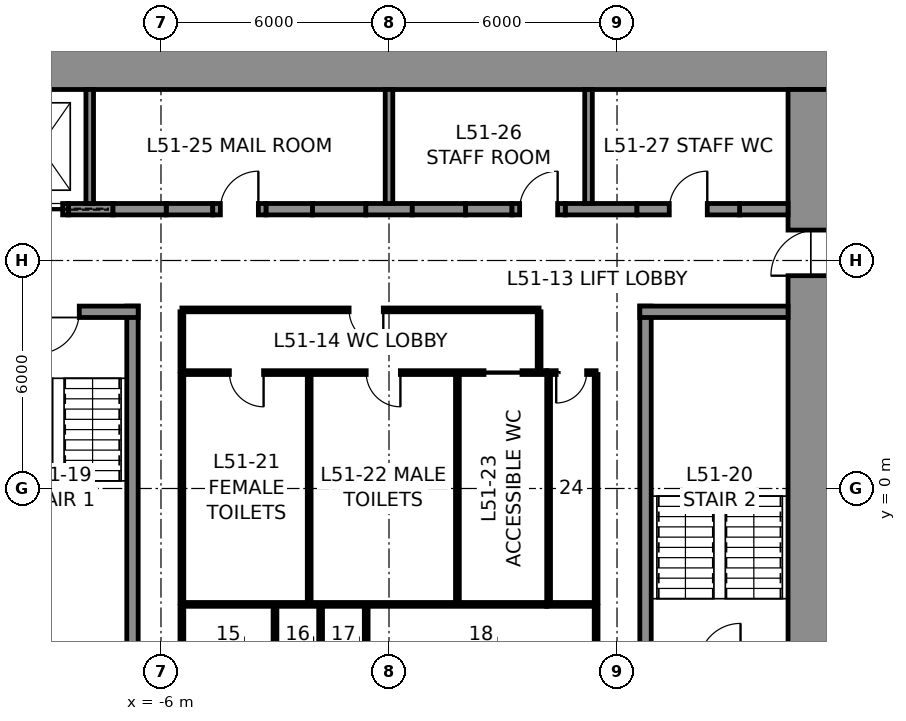
"""IFC4 building model, lengths in metres.
Left out: names, types, materials, properties, quantities, classifications, styles, units other than length and angle.
Written with IfcOpenShell. Run it as: python <this file> out.ifc"""

import sys

from ifc_helpers import new_model, si_unit, direction, frame, frame_2d, origin, place, context, subcontext, project, spatial, rectangle, extrude, element, fill, save


model = new_model("IFC4")
c1 = context("Model", 3, precision=1e-05, world=origin(), true_north=direction((0.0, 1.0)))
c2 = subcontext(c1, "Body", "Model", "MODEL_VIEW")
j1 = project(units=[si_unit("LENGTHUNIT", "METRE"), si_unit("PLANEANGLEUNIT", "RADIAN")], contexts=[c1])
p1 = place(None, origin())
s1 = spatial("IfcSite", under=j1, at=p1, CompositionType="ELEMENT")
p2 = place(p1, origin())
s2 = spatial("IfcBuilding", under=s1, at=p2, CompositionType="ELEMENT")
p3 = place(p2, frame((0.0, 0.0, 233.8)))
s3 = spatial("IfcBuildingStorey", under=s2, at=p3, CompositionType="ELEMENT", Elevation=233.8)
p4 = place(p3, frame((-12.0, 11.25, 0.0), z_axis=(0.0, 0.0, 1.0), x_axis=(1.0, 0.0, 0.0)))
e1 = element("IfcWall", 1, at=p4, inside=s3, PredefinedType="SHEAR", context=c2, shape_type="SweptSolid", body=[
    extrude(rectangle(XDim=24.0, YDim=1.5, at=frame_2d((12.0, 0.0))), origin(), (0.0, 0.0, 1.0), 4.0),
])
p5 = place(p3, frame((11.25, 10.5, 0.0), z_axis=(0.0, 0.0, 1.0), x_axis=(0.0, -1.0, 0.0)))
e2 = element("IfcWall", 2, at=p5, inside=s3, PredefinedType="SHEAR", context=c2, shape_type="SweptSolid", body=[
    extrude(rectangle(XDim=21.0, YDim=1.5, at=frame_2d((10.5, 0.0))), origin(), (0.0, 0.0, 1.0), 4.0),
])
p6 = place(p5, frame((3.7, 0.0, 0.0)))
e3 = element("IfcOpeningElement", 3, at=p6, cuts=e2, PredefinedType="OPENING", context=c2, shape_type="SweptSolid", body=[
    extrude(rectangle(XDim=1.2, YDim=2.3, at=frame_2d((0.6, 1.15))), frame((0.0, 0.76, 0.0), z_axis=(0.0, -1.0, 0.0), x_axis=(1.0, 0.0, 0.0)), (0.0, 0.0, 1.0), 1.52),
])
p7 = place(p5, frame((16.1, 0.0, 0.0)))
e4 = element("IfcOpeningElement", 4, at=p7, cuts=e2, PredefinedType="OPENING", context=c2, shape_type="SweptSolid", body=[
    extrude(rectangle(XDim=1.2, YDim=2.3, at=frame_2d((0.6, 1.15))), frame((0.0, 0.76, 0.0), z_axis=(0.0, -1.0, 0.0), x_axis=(1.0, 0.0, 0.0)), (0.0, 0.0, 1.0), 1.52),
])
p8 = place(p3, frame((-8.438, 7.35, 0.0), z_axis=(0.0, 0.0, 1.0), x_axis=(1.0, 0.0, 0.0)))
e5 = element("IfcWall", 5, at=p8, inside=s3, PredefinedType="SHEAR", context=c2, shape_type="SweptSolid", body=[
    extrude(rectangle(XDim=1.175, YDim=0.3, at=frame_2d((0.587, 0.0))), origin(), (0.0, 0.0, 1.0), 4.0),
])
for number, where, z_axis, x_axis in (
    (6, (-5.863, 7.35, 0.0), (0.0, 0.0, 1.0), (1.0, 0.0, 0.0)),
    (7, (-3.238, 7.35, 0.0), (0.0, 0.0, 1.0), (1.0, 0.0, 0.0)),
    (8, (-0.613, 7.35, 0.0), (0.0, 0.0, 1.0), (1.0, 0.0, 0.0)),
    (9, (2.012, 7.35, 0.0), (0.0, 0.0, 1.0), (1.0, 0.0, 0.0)),
):
    element("IfcWall", number, at=place(p3, frame(where, z_axis=z_axis, x_axis=x_axis)), inside=s3, PredefinedType="SHEAR", context=c2, shape_type="SweptSolid", body=[
        extrude(rectangle(XDim=1.225, YDim=0.3, at=frame_2d((0.613, 0.0))), origin(), (0.0, 0.0, 1.0), 4.0),
    ])
p9 = place(p3, frame((4.637, 7.35, 0.0), z_axis=(0.0, 0.0, 1.0), x_axis=(1.0, 0.0, 0.0)))
e10 = element("IfcWall", 10, at=p9, inside=s3, PredefinedType="SHEAR", context=c2, shape_type="SweptSolid", body=[
    extrude(rectangle(XDim=1.887, YDim=0.3, at=frame_2d((0.944, 0.0))), origin(), (0.0, 0.0, 1.0), 4.0),
])
p10 = place(p3, frame((9.225, 7.35, 0.0), z_axis=(0.0, 0.0, 1.0), x_axis=(1.0, 0.0, 0.0)))
e11 = element("IfcWall", 11, at=p10, inside=s3, PredefinedType="SHEAR", context=c2, shape_type="SweptSolid", body=[
    extrude(rectangle(XDim=1.275, YDim=0.3, at=frame_2d((0.637, 0.0))), origin(), (0.0, 0.0, 1.0), 4.0),
])
p11 = place(p3, frame((-9.938, 7.35, 0.0), z_axis=(0.0, 0.0, 1.0), x_axis=(1.0, 0.0, 0.0)))
e12 = element("IfcWall", 12, at=p11, inside=s3, PredefinedType="PARTITIONING", context=c2, shape_type="SweptSolid", body=[
    extrude(rectangle(XDim=1.5, YDim=0.3, at=frame_2d((0.75, 0.0))), origin(), (0.0, 0.0, 1.0), 4.0),
])
p12 = place(p11, frame((0.15, 0.0, 0.0)))
e13 = element("IfcOpeningElement", 13, at=p12, cuts=e12, PredefinedType="OPENING", context=c2, shape_type="SweptSolid", body=[
    extrude(rectangle(XDim=1.2, YDim=2.3, at=frame_2d((0.6, 1.15))), frame((0.0, 0.16, 0.0), z_axis=(0.0, -1.0, 0.0), x_axis=(1.0, 0.0, 0.0)), (0.0, 0.0, 1.0), 0.32),
])
p13 = place(p3, frame((-7.262, 7.35, 0.0), z_axis=(0.0, 0.0, 1.0), x_axis=(1.0, 0.0, 0.0)))
e14 = element("IfcWall", 14, at=p13, inside=s3, PredefinedType="PARTITIONING", context=c2, shape_type="SweptSolid", body=[
    extrude(rectangle(XDim=1.4, YDim=0.3, at=frame_2d((0.7, 0.0))), origin(), (0.0, 0.0, 1.0), 4.0),
])
p14 = place(p3, frame((-4.637, 7.35, 0.0), z_axis=(0.0, 0.0, 1.0), x_axis=(1.0, 0.0, 0.0)))
e15 = element("IfcWall", 15, at=p14, inside=s3, PredefinedType="PARTITIONING", context=c2, shape_type="SweptSolid", body=[
    extrude(rectangle(XDim=1.4, YDim=0.3, at=frame_2d((0.7, 0.0))), origin(), (0.0, 0.0, 1.0), 4.0),
])
p15 = place(p14, frame((0.2, 0.0, 0.0)))
e16 = element("IfcOpeningElement", 16, at=p15, cuts=e15, PredefinedType="OPENING", context=c2, shape_type="SweptSolid", body=[
    extrude(rectangle(XDim=1.0, YDim=2.3, at=frame_2d((0.5, 1.15))), frame((0.0, 0.16, 0.0), z_axis=(0.0, -1.0, 0.0), x_axis=(1.0, 0.0, 0.0)), (0.0, 0.0, 1.0), 0.32),
])
for number, where, z_axis, x_axis in (
    (17, (-2.012, 7.35, 0.0), (0.0, 0.0, 1.0), (1.0, 0.0, 0.0)),
    (18, (0.613, 7.35, 0.0), (0.0, 0.0, 1.0), (1.0, 0.0, 0.0)),
):
    element("IfcWall", number, at=place(p3, frame(where, z_axis=z_axis, x_axis=x_axis)), inside=s3, PredefinedType="PARTITIONING", context=c2, shape_type="SweptSolid", body=[
        extrude(rectangle(XDim=1.4, YDim=0.3, at=frame_2d((0.7, 0.0))), origin(), (0.0, 0.0, 1.0), 4.0),
    ])
p16 = place(p3, frame((3.238, 7.35, 0.0), z_axis=(0.0, 0.0, 1.0), x_axis=(1.0, 0.0, 0.0)))
e19 = element("IfcWall", 19, at=p16, inside=s3, PredefinedType="PARTITIONING", context=c2, shape_type="SweptSolid", body=[
    extrude(rectangle(XDim=1.4, YDim=0.3, at=frame_2d((0.7, 0.0))), origin(), (0.0, 0.0, 1.0), 4.0),
])
p17 = place(p16, frame((0.2, 0.0, 0.0)))
e20 = element("IfcOpeningElement", 20, at=p17, cuts=e19, PredefinedType="OPENING", context=c2, shape_type="SweptSolid", body=[
    extrude(rectangle(XDim=1.0, YDim=2.3, at=frame_2d((0.5, 1.15))), frame((0.0, 0.16, 0.0), z_axis=(0.0, -1.0, 0.0), x_axis=(1.0, 0.0, 0.0)), (0.0, 0.0, 1.0), 0.32),
])
p18 = place(p3, frame((6.525, 7.35, 0.0), z_axis=(0.0, 0.0, 1.0), x_axis=(1.0, 0.0, 0.0)))
e21 = element("IfcWall", 21, at=p18, inside=s3, PredefinedType="PARTITIONING", context=c2, shape_type="SweptSolid", body=[
    extrude(rectangle(XDim=2.7, YDim=0.3, at=frame_2d((1.35, 0.0))), origin(), (0.0, 0.0, 1.0), 4.0),
])
p19 = place(p18, frame((0.85, 0.0, 0.0)))
e22 = element("IfcOpeningElement", 22, at=p19, cuts=e21, PredefinedType="OPENING", context=c2, shape_type="SweptSolid", body=[
    extrude(rectangle(XDim=1.0, YDim=2.3, at=frame_2d((0.5, 1.15))), frame((0.0, 0.16, 0.0), z_axis=(0.0, -1.0, 0.0), x_axis=(1.0, 0.0, 0.0)), (0.0, 0.0, 1.0), 0.32),
])
for number, where, z_axis, x_axis in (
    (23, (-7.875, 7.5, 0.0), (0.0, 0.0, 1.0), (0.0, 1.0, 0.0)),
    (24, (0.0, 7.5, 0.0), (0.0, 0.0, 1.0), (0.0, 1.0, 0.0)),
    (25, (5.25, 7.5, 0.0), (0.0, 0.0, 1.0), (0.0, 1.0, 0.0)),
):
    element("IfcWall", number, at=place(p3, frame(where, z_axis=z_axis, x_axis=x_axis)), inside=s3, PredefinedType="PARTITIONING", context=c2, shape_type="SweptSolid", body=[
        extrude(rectangle(XDim=3.0, YDim=0.2, at=frame_2d((1.5, 0.0))), origin(), (0.0, 0.0, 1.0), 4.0),
    ])
p20 = place(p3, frame((-6.75, -4.8, 0.0), z_axis=(0.0, 0.0, 1.0), x_axis=(0.0, 1.0, 0.0)))
e26 = element("IfcWall", 26, at=p20, inside=s3, PredefinedType="SOLIDWALL", context=c2, shape_type="SweptSolid", body=[
    extrude(rectangle(XDim=9.6, YDim=0.3, at=frame_2d((4.8, 0.0))), origin(), (0.0, 0.0, 1.0), 3.75),
])
p21 = place(p3, frame((-10.5, 4.65, 0.0), z_axis=(0.0, 0.0, 1.0), x_axis=(1.0, 0.0, 0.0)))
e27 = element("IfcWall", 27, at=p21, inside=s3, PredefinedType="SOLIDWALL", context=c2, shape_type="SweptSolid", body=[
    extrude(rectangle(XDim=3.9, YDim=0.3, at=frame_2d((1.95, 0.0))), origin(), (0.0, 0.0, 1.0), 3.75),
])
p22 = place(p21, frame((1.25, 0.0, 0.0)))
e28 = element("IfcOpeningElement", 28, at=p22, cuts=e27, PredefinedType="OPENING", context=c2, shape_type="SweptSolid", body=[
    extrude(rectangle(XDim=1.1, YDim=2.3, at=frame_2d((0.55, 1.15))), frame((0.0, 0.16, 0.0), z_axis=(0.0, -1.0, 0.0), x_axis=(1.0, 0.0, 0.0)), (0.0, 0.0, 1.0), 0.32),
])
p23 = place(p3, frame((6.75, -4.8, 0.0), z_axis=(0.0, 0.0, 1.0), x_axis=(0.0, 1.0, 0.0)))
e29 = element("IfcWall", 29, at=p23, inside=s3, PredefinedType="SOLIDWALL", context=c2, shape_type="SweptSolid", body=[
    extrude(rectangle(XDim=9.6, YDim=0.3, at=frame_2d((4.8, 0.0))), origin(), (0.0, 0.0, 1.0), 3.75),
])
p24 = place(p3, frame((6.6, 4.65, 0.0), z_axis=(0.0, 0.0, 1.0), x_axis=(1.0, 0.0, 0.0)))
e30 = element("IfcWall", 30, at=p24, inside=s3, PredefinedType="SOLIDWALL", context=c2, shape_type="SweptSolid", body=[
    extrude(rectangle(XDim=3.9, YDim=0.3, at=frame_2d((1.95, 0.0))), origin(), (0.0, 0.0, 1.0), 3.75),
])
p25 = place(p3, frame((-5.45, 3.05, 0.0), z_axis=(0.0, 0.0, 1.0), x_axis=(1.0, 0.0, 0.0)))
e31 = element("IfcWall", 31, at=p25, inside=s3, PredefinedType="PARTITIONING", context=c2, shape_type="SweptSolid", body=[
    extrude(rectangle(XDim=9.6, YDim=0.1, at=frame_2d((4.8, 0.0))), origin(), (0.0, 0.0, 1.0), 3.75),
])
p26 = place(p25, frame((1.25, 0.0, 0.0)))
e32 = element("IfcOpeningElement", 32, at=p26, cuts=e31, PredefinedType="OPENING", context=c2, shape_type="SweptSolid", body=[
    extrude(rectangle(XDim=0.9, YDim=2.3, at=frame_2d((0.45, 1.15))), frame((0.0, 0.06, 0.0), z_axis=(0.0, -1.0, 0.0), x_axis=(1.0, 0.0, 0.0)), (0.0, 0.0, 1.0), 0.12),
])
p27 = place(p25, frame((4.85, 0.0, 0.0)))
e33 = element("IfcOpeningElement", 33, at=p27, cuts=e31, PredefinedType="OPENING", context=c2, shape_type="SweptSolid", body=[
    extrude(rectangle(XDim=0.9, YDim=2.3, at=frame_2d((0.45, 1.15))), frame((0.0, 0.06, 0.0), z_axis=(0.0, -1.0, 0.0), x_axis=(1.0, 0.0, 0.0)), (0.0, 0.0, 1.0), 0.12),
])
p28 = place(p25, frame((7.95, 0.0, 0.0)))
e34 = element("IfcOpeningElement", 34, at=p28, cuts=e31, PredefinedType="OPENING", context=c2, shape_type="SweptSolid", body=[
    extrude(rectangle(XDim=1.0, YDim=2.3, at=frame_2d((0.5, 1.15))), frame((0.0, 0.06, 0.0), z_axis=(0.0, -1.0, 0.0), x_axis=(1.0, 0.0, 0.0)), (0.0, 0.0, 1.0), 0.12),
])
p29 = place(p3, frame((4.15, 3.05, 0.0), z_axis=(0.0, 0.0, 1.0), x_axis=(1.0, 0.0, 0.0)))
e35 = element("IfcWall", 35, at=p29, inside=s3, PredefinedType="PARTITIONING", context=c2, shape_type="SweptSolid", body=[
    extrude(rectangle(XDim=1.3, YDim=0.1, at=frame_2d((0.65, 0.0))), origin(), (0.0, 0.0, 1.0), 3.75),
])
p30 = place(p29, frame((0.25, 0.0, 0.0)))
e36 = element("IfcOpeningElement", 36, at=p30, cuts=e35, PredefinedType="OPENING", context=c2, shape_type="SweptSolid", body=[
    extrude(rectangle(XDim=0.8, YDim=2.3, at=frame_2d((0.4, 1.15))), frame((0.0, 0.06, 0.0), z_axis=(0.0, -1.0, 0.0), x_axis=(1.0, 0.0, 0.0)), (0.0, 0.0, 1.0), 0.12),
])
p31 = place(p3, frame((4.15, -3.05, 0.0), z_axis=(0.0, 0.0, 1.0), x_axis=(-1.0, 0.0, 0.0)))
e37 = element("IfcWall", 37, at=p31, inside=s3, PredefinedType="PARTITIONING", context=c2, shape_type="SweptSolid", body=[
    extrude(rectangle(XDim=9.6, YDim=0.1, at=frame_2d((4.8, 0.0))), origin(), (0.0, 0.0, 1.0), 3.75),
])
p32 = place(p3, frame((5.45, -3.05, 0.0), z_axis=(0.0, 0.0, 1.0), x_axis=(-1.0, 0.0, 0.0)))
e38 = element("IfcWall", 38, at=p32, inside=s3, PredefinedType="PARTITIONING", context=c2, shape_type="SweptSolid", body=[
    extrude(rectangle(XDim=1.3, YDim=0.1, at=frame_2d((0.65, 0.0))), origin(), (0.0, 0.0, 1.0), 3.75),
])
for number, where, z_axis, x_axis in (
    (39, (5.45, 3.0, 0.0), (0.0, 0.0, 1.0), (0.0, -1.0, 0.0)),
    (40, (-5.45, -3.0, 0.0), (0.0, 0.0, 1.0), (0.0, 1.0, 0.0)),
    (41, (-2.1, -3.0, 0.0), (0.0, 0.0, 1.0), (0.0, 1.0, 0.0)),
    (42, (1.8, -3.0, 0.0), (0.0, 0.0, 1.0), (0.0, 1.0, 0.0)),
    (43, (4.2, -3.0, 0.0), (0.0, 0.0, 1.0), (0.0, 1.0, 0.0)),
):
    element("IfcWall", number, at=place(p3, frame(where, z_axis=z_axis, x_axis=x_axis)), inside=s3, PredefinedType="PARTITIONING", context=c2, shape_type="SweptSolid", body=[
        extrude(rectangle(XDim=6.0, YDim=0.1, at=frame_2d((3.0, 0.0))), origin(), (0.0, 0.0, 1.0), 3.75),
    ])
p33 = place(p3, frame((-5.45, 4.7, 0.0), z_axis=(0.0, 0.0, 1.0), x_axis=(1.0, 0.0, 0.0)))
e44 = element("IfcWall", 44, at=p33, inside=s3, PredefinedType="PARTITIONING", context=c2, shape_type="SweptSolid", body=[
    extrude(rectangle(XDim=9.4, YDim=0.1, at=frame_2d((4.7, 0.0))), origin(), (0.0, 0.0, 1.0), 3.75),
])
p34 = place(p33, frame((4.4, 0.0, 0.0)))
e45 = element("IfcOpeningElement", 45, at=p34, cuts=e44, PredefinedType="OPENING", context=c2, shape_type="SweptSolid", body=[
    extrude(rectangle(XDim=0.9, YDim=2.3, at=frame_2d((0.45, 1.15))), frame((0.0, 0.06, 0.0), z_axis=(0.0, -1.0, 0.0), x_axis=(1.0, 0.0, 0.0)), (0.0, 0.0, 1.0), 0.12),
])
for number, where, z_axis, x_axis in (
    (46, (-5.45, 3.1, 0.0), (0.0, 0.0, 1.0), (0.0, 1.0, 0.0)),
    (47, (3.95, 3.1, 0.0), (0.0, 0.0, 1.0), (0.0, 1.0, 0.0)),
    (48, (-5.45, -3.1, 0.0), (0.0, 0.0, 1.0), (0.0, -1.0, 0.0)),
    (49, (5.45, -3.1, 0.0), (0.0, 0.0, 1.0), (0.0, -1.0, 0.0)),
    (50, (-3.0, -3.1, 0.0), (0.0, 0.0, 1.0), (0.0, -1.0, 0.0)),
    (51, (-1.8, -3.1, 0.0), (0.0, 0.0, 1.0), (0.0, -1.0, 0.0)),
    (52, (-0.6, -3.1, 0.0), (0.0, 0.0, 1.0), (0.0, -1.0, 0.0)),
):
    element("IfcWall", number, at=place(p3, frame(where, z_axis=z_axis, x_axis=x_axis)), inside=s3, PredefinedType="PARTITIONING", context=c2, shape_type="SweptSolid", body=[
        extrude(rectangle(XDim=1.55, YDim=0.1, at=frame_2d((0.775, 0.0))), origin(), (0.0, 0.0, 1.0), 3.75),
    ])
p35 = place(p22, frame((1.1, 0.0, 0.0), z_axis=(0.0, 0.0, 1.0), x_axis=(-1.0, 0.0, 0.0)))
e53 = element("IfcDoor", 53, at=p35, inside=s3, OperationType="SINGLE_SWING_RIGHT", PredefinedType="DOOR", context=c2, shape_type="SweptSolid", body=[
    extrude(rectangle(XDim=1.1, YDim=2.3, at=frame_2d((0.55, 1.15))), frame((0.0, 0.025, 0.0), z_axis=(0.0, -1.0, 0.0), x_axis=(1.0, 0.0, 0.0)), (0.0, 0.0, 1.0), 0.05),
])
fill(e28, e53)
p36 = place(p26, frame((0.9, 0.0, 0.0), z_axis=(0.0, 0.0, 1.0), x_axis=(-1.0, 0.0, 0.0)))
e54 = element("IfcDoor", 54, at=p36, inside=s3, OperationType="SINGLE_SWING_LEFT", PredefinedType="DOOR", context=c2, shape_type="SweptSolid", body=[
    extrude(rectangle(XDim=0.9, YDim=2.3, at=frame_2d((0.45, 1.15))), frame((0.0, 0.025, 0.0), z_axis=(0.0, -1.0, 0.0), x_axis=(1.0, 0.0, 0.0)), (0.0, 0.0, 1.0), 0.05),
])
fill(e32, e54)
p37 = place(p27, frame((0.9, 0.0, 0.0), z_axis=(0.0, 0.0, 1.0), x_axis=(-1.0, 0.0, 0.0)))
e55 = element("IfcDoor", 55, at=p37, inside=s3, OperationType="SINGLE_SWING_LEFT", PredefinedType="DOOR", context=c2, shape_type="SweptSolid", body=[
    extrude(rectangle(XDim=0.9, YDim=2.3, at=frame_2d((0.45, 1.15))), frame((0.0, 0.025, 0.0), z_axis=(0.0, -1.0, 0.0), x_axis=(1.0, 0.0, 0.0)), (0.0, 0.0, 1.0), 0.05),
])
fill(e33, e55)
p38 = place(p28, frame((1.0, 0.0, 0.0), z_axis=(0.0, 0.0, 1.0), x_axis=(-1.0, 0.0, 0.0)))
e56 = element("IfcDoor", 56, at=p38, inside=s3, OperationType="SLIDING_TO_LEFT", PredefinedType="DOOR", context=c2, shape_type="SweptSolid", body=[
    extrude(rectangle(XDim=1.0, YDim=2.3, at=frame_2d((0.5, 1.15))), frame((0.0, 0.025, 0.0), z_axis=(0.0, -1.0, 0.0), x_axis=(1.0, 0.0, 0.0)), (0.0, 0.0, 1.0), 0.05),
])
fill(e34, e56)
p39 = place(p30, frame((0.8, 0.0, 0.0), z_axis=(0.0, 0.0, 1.0), x_axis=(-1.0, 0.0, 0.0)))
e57 = element("IfcDoor", 57, at=p39, inside=s3, OperationType="SINGLE_SWING_RIGHT", PredefinedType="DOOR", context=c2, shape_type="SweptSolid", body=[
    extrude(rectangle(XDim=0.8, YDim=2.3, at=frame_2d((0.4, 1.15))), frame((0.0, 0.025, 0.0), z_axis=(0.0, -1.0, 0.0), x_axis=(1.0, 0.0, 0.0)), (0.0, 0.0, 1.0), 0.05),
])
fill(e36, e57)
p40 = place(p34, frame((0.9, 0.0, 0.0), z_axis=(0.0, 0.0, 1.0), x_axis=(-1.0, 0.0, 0.0)))
e58 = element("IfcDoor", 58, at=p40, inside=s3, OperationType="SINGLE_SWING_LEFT", PredefinedType="DOOR", context=c2, shape_type="SweptSolid", body=[
    extrude(rectangle(XDim=0.9, YDim=2.3, at=frame_2d((0.45, 1.15))), frame((0.0, 0.025, 0.0), z_axis=(0.0, -1.0, 0.0), x_axis=(1.0, 0.0, 0.0)), (0.0, 0.0, 1.0), 0.05),
])
fill(e45, e58)
p41 = place(p15, origin())
e59 = element("IfcDoor", 59, at=p41, inside=s3, OperationType="SINGLE_SWING_RIGHT", PredefinedType="DOOR", context=c2, shape_type="SweptSolid", body=[
    extrude(rectangle(XDim=1.0, YDim=2.3, at=frame_2d((0.5, 1.15))), frame((0.0, 0.025, 0.0), z_axis=(0.0, -1.0, 0.0), x_axis=(1.0, 0.0, 0.0)), (0.0, 0.0, 1.0), 0.05),
])
fill(e16, e59)
p42 = place(p17, origin())
e60 = element("IfcDoor", 60, at=p42, inside=s3, OperationType="SINGLE_SWING_RIGHT", PredefinedType="DOOR", context=c2, shape_type="SweptSolid", body=[
    extrude(rectangle(XDim=1.0, YDim=2.3, at=frame_2d((0.5, 1.15))), frame((0.0, 0.025, 0.0), z_axis=(0.0, -1.0, 0.0), x_axis=(1.0, 0.0, 0.0)), (0.0, 0.0, 1.0), 0.05),
])
fill(e20, e60)
p43 = place(p19, origin())
e61 = element("IfcDoor", 61, at=p43, inside=s3, OperationType="SINGLE_SWING_RIGHT", PredefinedType="DOOR", context=c2, shape_type="SweptSolid", body=[
    extrude(rectangle(XDim=1.0, YDim=2.3, at=frame_2d((0.5, 1.15))), frame((0.0, 0.025, 0.0), z_axis=(0.0, -1.0, 0.0), x_axis=(1.0, 0.0, 0.0)), (0.0, 0.0, 1.0), 0.05),
])
fill(e22, e61)
p44 = place(p6, frame((1.2, 0.0, 0.0), z_axis=(0.0, 0.0, 1.0), x_axis=(-1.0, 0.0, 0.0)))
e62 = element("IfcDoor", 62, at=p44, inside=s3, OperationType="SINGLE_SWING_LEFT", PredefinedType="DOOR", context=c2, shape_type="SweptSolid", body=[
    extrude(rectangle(XDim=1.2, YDim=2.3, at=frame_2d((0.6, 1.15))), frame((0.0, 0.025, 0.0), z_axis=(0.0, -1.0, 0.0), x_axis=(1.0, 0.0, 0.0)), (0.0, 0.0, 1.0), 0.05),
])
fill(e3, e62)
p45 = place(p12, frame((1.2, 0.0, 0.0), z_axis=(0.0, 0.0, 1.0), x_axis=(-1.0, 0.0, 0.0)))
e63 = element("IfcDoor", 63, at=p45, inside=s3, OperationType="SLIDING_TO_LEFT", PredefinedType="DOOR", context=c2, shape_type="SweptSolid", body=[
    extrude(rectangle(XDim=1.2, YDim=2.3, at=frame_2d((0.6, 1.15))), frame((0.0, 0.025, 0.0), z_axis=(0.0, -1.0, 0.0), x_axis=(1.0, 0.0, 0.0)), (0.0, 0.0, 1.0), 0.05),
])
fill(e13, e63)
save(model, sys.argv[1])
